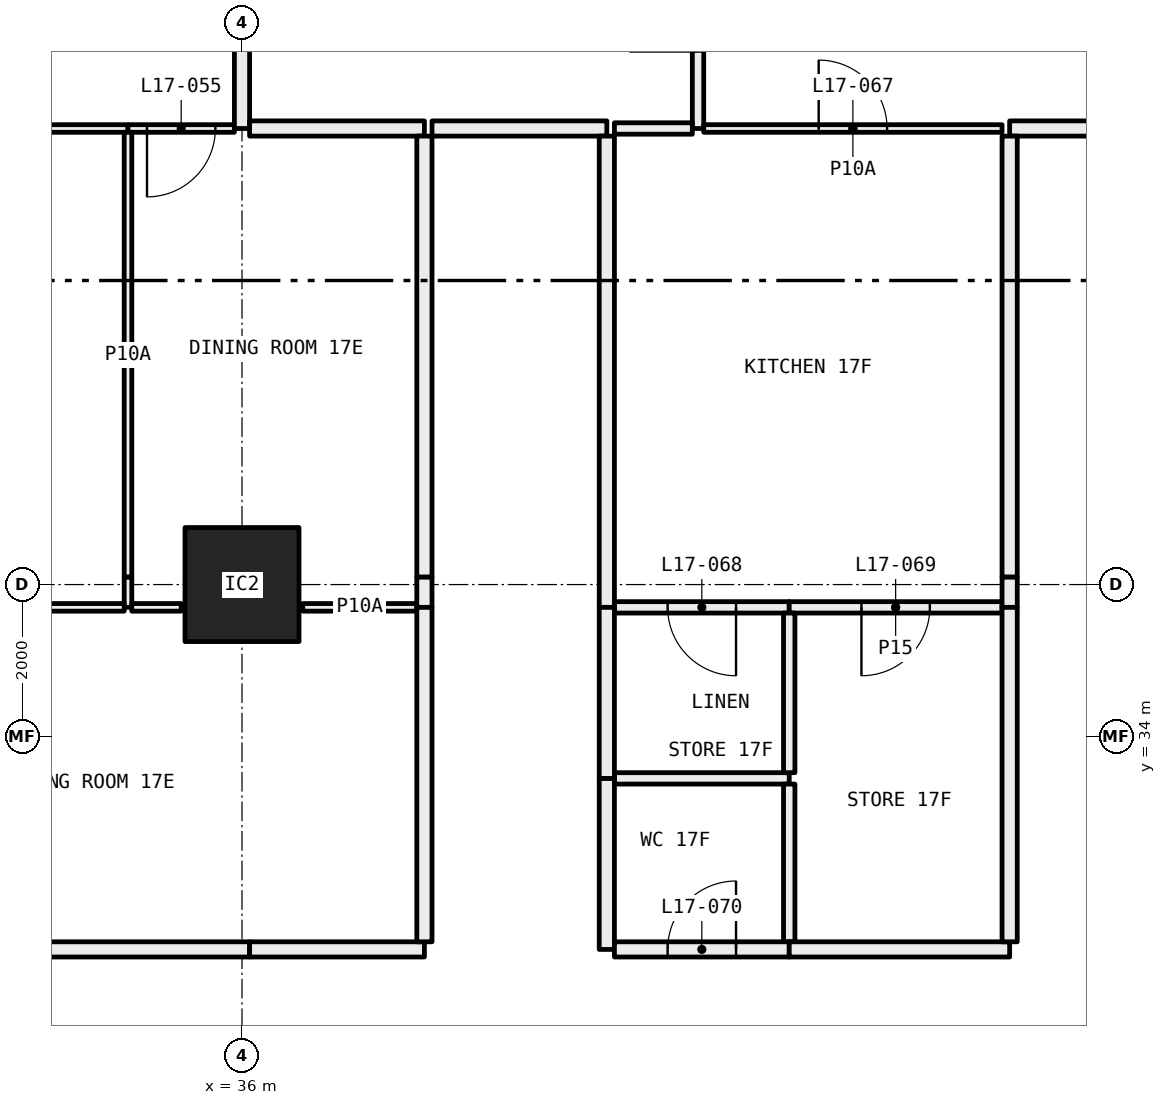
"""IFC4 building model, lengths in metres.
Left out: names, types, materials, properties, quantities, classifications, styles, units other than length and angle.
Written with IfcOpenShell. Run it as: python <this file> out.ifc"""

import sys

from ifc_helpers import new_model, si_unit, direction, frame, frame_2d, origin, origin_2d, place, context, subcontext, project, spatial, rectangle, hollow_rectangle, extrude, element, fill, save


model = new_model("IFC4")
c1 = context("Model", 3, precision=1e-05, world=origin(), true_north=direction((0.0, 1.0)))
c2 = subcontext(c1, "Body", "Model", "MODEL_VIEW")
j1 = project(units=[si_unit("LENGTHUNIT", "METRE"), si_unit("PLANEANGLEUNIT", "RADIAN")], contexts=[c1])
p1 = place(None, origin())
s1 = spatial("IfcSite", under=j1, at=p1, CompositionType="ELEMENT")
p2 = place(p1, origin())
s2 = spatial("IfcBuilding", under=s1, at=p2, CompositionType="ELEMENT")
p3 = place(p2, frame((0.0, 0.0, 71.4)))
s3 = spatial("IfcBuildingStorey", under=s2, at=p3, CompositionType="ELEMENT", Elevation=71.4)
p4 = place(p3, frame((36.0, 36.0, 0.0), z_axis=(0.0, 0.0, 1.0), x_axis=(1.0, 0.0, 0.0)))
e1 = element("IfcColumn", 1, at=p4, inside=s3, PredefinedType="COLUMN", context=c2, shape_type="SweptSolid", body=[
    extrude(hollow_rectangle(XDim=1.5, YDim=1.5, WallThickness=0.065, at=origin_2d()), origin(), (0.0, 0.0, 1.0), 3.05),
])
p5 = place(p3, frame((30.05, 42.0, 0.0), z_axis=(0.0, 0.0, 1.0), x_axis=(1.0, 0.0, 0.0)))
e2 = element("IfcWall", 2, at=p5, inside=s3, PredefinedType="PARTITIONING", context=c2, shape_type="SweptSolid", body=[
    extrude(rectangle(XDim=4.45, YDim=0.1, at=frame_2d((2.225, 0.0))), origin(), (0.0, 0.0, 1.0), 3.05),
])
p6 = place(p5, frame((1.775, 0.0, 0.0)))
e3 = element("IfcOpeningElement", 3, at=p6, cuts=e2, PredefinedType="OPENING", context=c2, shape_type="SweptSolid", body=[
    extrude(rectangle(XDim=0.9, YDim=2.1, at=frame_2d((0.45, 1.05))), frame((0.0, 0.06, 0.0), z_axis=(0.0, -1.0, 0.0), x_axis=(1.0, 0.0, 0.0)), (0.0, 0.0, 1.0), 0.12),
])
p7 = place(p3, frame((34.5, 42.0, 0.0), z_axis=(0.0, 0.0, 1.0), x_axis=(1.0, 0.0, 0.0)))
e4 = element("IfcWall", 4, at=p7, inside=s3, PredefinedType="PARTITIONING", context=c2, shape_type="SweptSolid", body=[
    extrude(rectangle(XDim=1.4, YDim=0.1, at=frame_2d((0.7, 0.0))), origin(), (0.0, 0.0, 1.0), 3.05),
])
p8 = place(p7, frame((0.25, 0.0, 0.0)))
e5 = element("IfcOpeningElement", 5, at=p8, cuts=e4, PredefinedType="OPENING", context=c2, shape_type="SweptSolid", body=[
    extrude(rectangle(XDim=0.9, YDim=2.1, at=frame_2d((0.45, 1.05))), frame((0.0, 0.06, 0.0), z_axis=(0.0, -1.0, 0.0), x_axis=(1.0, 0.0, 0.0)), (0.0, 0.0, 1.0), 0.12),
])
p9 = place(p3, frame((36.0, 42.0, 0.0), z_axis=(0.0, 0.0, 1.0), x_axis=(0.0, 1.0, 0.0)))
e6 = element("IfcWall", 6, at=p9, inside=s3, PredefinedType="PARTITIONING", context=c2, shape_type="SweptSolid", body=[
    extrude(rectangle(XDim=3.0, YDim=0.2, at=frame_2d((1.5, 0.0))), origin(), (0.0, 0.0, 1.0), 2.45),
])
p10 = place(p3, frame((34.5, 35.7, 0.0), z_axis=(0.0, 0.0, 1.0), x_axis=(0.0, 1.0, 0.0)))
e7 = element("IfcWall", 7, at=p10, inside=s3, PredefinedType="PARTITIONING", context=c2, shape_type="SweptSolid", body=[
    extrude(rectangle(XDim=0.4, YDim=0.1, at=frame_2d((0.2, 0.0))), origin(), (0.0, 0.0, 1.0), 2.45),
])
p11 = place(p3, frame((34.5, 36.1, 0.0), z_axis=(0.0, 0.0, 1.0), x_axis=(0.0, 1.0, 0.0)))
e8 = element("IfcWall", 8, at=p11, inside=s3, PredefinedType="PARTITIONING", context=c2, shape_type="SweptSolid", body=[
    extrude(rectangle(XDim=5.85, YDim=0.1, at=frame_2d((2.925, 0.0))), origin(), (0.0, 0.0, 1.0), 3.05),
])
p12 = place(p3, frame((30.075, 35.7, 0.0), z_axis=(0.0, 0.0, 1.0), x_axis=(1.0, 0.0, 0.0)))
e9 = element("IfcWall", 9, at=p12, inside=s3, PredefinedType="PARTITIONING", context=c2, shape_type="SweptSolid", body=[
    extrude(rectangle(XDim=4.375, YDim=0.1, at=frame_2d((2.188, 0.0))), origin(), (0.0, 0.0, 1.0), 3.05),
])
p13 = place(p12, frame((1.738, 0.0, 0.0)))
e10 = element("IfcOpeningElement", 10, at=p13, cuts=e9, PredefinedType="OPENING", context=c2, shape_type="SweptSolid", body=[
    extrude(rectangle(XDim=0.9, YDim=2.1, at=frame_2d((0.45, 1.05))), frame((0.0, 0.06, 0.0), z_axis=(0.0, -1.0, 0.0), x_axis=(1.0, 0.0, 0.0)), (0.0, 0.0, 1.0), 0.12),
])
p14 = place(p3, frame((34.55, 35.7, 0.0), z_axis=(0.0, 0.0, 1.0), x_axis=(1.0, 0.0, 0.0)))
e11 = element("IfcWall", 11, at=p14, inside=s3, PredefinedType="PARTITIONING", context=c2, shape_type="SweptSolid", body=[
    extrude(rectangle(XDim=0.65, YDim=0.1, at=frame_2d((0.325, 0.0))), origin(), (0.0, 0.0, 1.0), 3.05),
])
p15 = place(p3, frame((36.8, 35.7, 0.0), z_axis=(0.0, 0.0, 1.0), x_axis=(1.0, 0.0, 0.0)))
e12 = element("IfcWall", 12, at=p15, inside=s3, PredefinedType="PARTITIONING", context=c2, shape_type="SweptSolid", body=[
    extrude(rectangle(XDim=1.5, YDim=0.1, at=frame_2d((0.75, 0.0))), origin(), (0.0, 0.0, 1.0), 3.05),
])
p16 = place(p3, frame((38.4, 42.0, 0.0), z_axis=(0.0, 0.0, 1.0), x_axis=(-1.0, 0.0, 0.0)))
e13 = element("IfcWall", 13, at=p16, inside=s3, PredefinedType="PARTITIONING", context=c2, shape_type="SweptSolid", body=[
    extrude(rectangle(XDim=2.3, YDim=0.2, at=frame_2d((1.15, 0.0))), origin(), (0.0, 0.0, 1.0), 3.05),
])
p17 = place(p3, frame((38.4, 35.7, 0.0), z_axis=(0.0, 0.0, 1.0), x_axis=(0.0, 1.0, 0.0)))
e14 = element("IfcWall", 14, at=p17, inside=s3, PredefinedType="PARTITIONING", context=c2, shape_type="SweptSolid", body=[
    extrude(rectangle(XDim=0.4, YDim=0.2, at=frame_2d((0.2, 0.0))), origin(), (0.0, 0.0, 1.0), 2.45),
])
p18 = place(p3, frame((38.4, 36.1, 0.0), z_axis=(0.0, 0.0, 1.0), x_axis=(0.0, 1.0, 0.0)))
e15 = element("IfcWall", 15, at=p18, inside=s3, PredefinedType="PARTITIONING", context=c2, shape_type="SweptSolid", body=[
    extrude(rectangle(XDim=5.8, YDim=0.2, at=frame_2d((2.9, 0.0))), origin(), (0.0, 0.0, 1.0), 3.05),
])
p19 = place(p3, frame((30.0, 31.2, 0.0), z_axis=(0.0, 0.0, 1.0), x_axis=(1.0, 0.0, 0.0)))
e16 = element("IfcWall", 16, at=p19, inside=s3, PredefinedType="PARTITIONING", context=c2, shape_type="SweptSolid", body=[
    extrude(rectangle(XDim=6.1, YDim=0.2, at=frame_2d((3.05, 0.0))), origin(), (0.0, 0.0, 1.0), 2.45),
])
p20 = place(p3, frame((36.1, 31.2, 0.0), z_axis=(0.0, 0.0, 1.0), x_axis=(1.0, 0.0, 0.0)))
e17 = element("IfcWall", 17, at=p20, inside=s3, PredefinedType="PARTITIONING", context=c2, shape_type="SweptSolid", body=[
    extrude(rectangle(XDim=2.3, YDim=0.2, at=frame_2d((1.15, 0.0))), origin(), (0.0, 0.0, 1.0), 3.05),
])
p21 = place(p3, frame((38.4, 31.3, 0.0), z_axis=(0.0, 0.0, 1.0), x_axis=(0.0, 1.0, 0.0)))
e18 = element("IfcWall", 18, at=p21, inside=s3, PredefinedType="PARTITIONING", context=c2, shape_type="SweptSolid", body=[
    extrude(rectangle(XDim=4.4, YDim=0.2, at=frame_2d((2.2, 0.0))), origin(), (0.0, 0.0, 1.0), 3.05),
])
p22 = place(p3, frame((42.0, 42.0, 0.0), z_axis=(0.0, 0.0, 1.0), x_axis=(0.0, 1.0, 0.0)))
e19 = element("IfcWall", 19, at=p22, inside=s3, PredefinedType="PARTITIONING", context=c2, shape_type="SweptSolid", body=[
    extrude(rectangle(XDim=2.925, YDim=0.15, at=frame_2d((1.462, 0.0))), origin(), (0.0, 0.0, 1.0), 3.05),
])
p23 = place(p22, frame((1.012, 0.0, 0.0)))
e20 = element("IfcOpeningElement", 20, at=p23, cuts=e19, PredefinedType="OPENING", context=c2, shape_type="SweptSolid", body=[
    extrude(rectangle(XDim=0.9, YDim=2.1, at=frame_2d((0.45, 1.05))), frame((0.0, 0.085, 0.0), z_axis=(0.0, -1.0, 0.0), x_axis=(1.0, 0.0, 0.0)), (0.0, 0.0, 1.0), 0.17),
])
p24 = place(p3, frame((40.9, 42.0, 0.0), z_axis=(0.0, 0.0, 1.0), x_axis=(1.0, 0.0, 0.0)))
e21 = element("IfcWall", 21, at=p24, inside=s3, PredefinedType="PARTITIONING", context=c2, shape_type="SweptSolid", body=[
    extrude(rectangle(XDim=1.025, YDim=0.15, at=frame_2d((0.513, 0.0))), origin(), (0.0, 0.0, 1.0), 3.05),
])
p25 = place(p3, frame((38.5, 42.0, 0.0), z_axis=(0.0, 0.0, 1.0), x_axis=(1.0, 0.0, 0.0)))
e22 = element("IfcWall", 22, at=p25, inside=s3, PredefinedType="PARTITIONING", context=c2, shape_type="SweptSolid", body=[
    extrude(rectangle(XDim=2.3, YDim=0.2, at=frame_2d((1.15, 0.0))), origin(), (0.0, 0.0, 1.0), 3.05),
])
p26 = place(p3, frame((42.075, 42.0, 0.0), z_axis=(0.0, 0.0, 1.0), x_axis=(1.0, 0.0, 0.0)))
e23 = element("IfcWall", 23, at=p26, inside=s3, PredefinedType="PARTITIONING", context=c2, shape_type="SweptSolid", body=[
    extrude(rectangle(XDim=3.925, YDim=0.1, at=frame_2d((1.962, 0.0))), origin(), (0.0, 0.0, 1.0), 3.05),
])
p27 = place(p26, frame((1.512, 0.0, 0.0)))
e24 = element("IfcOpeningElement", 24, at=p27, cuts=e23, PredefinedType="OPENING", context=c2, shape_type="SweptSolid", body=[
    extrude(rectangle(XDim=0.9, YDim=2.1, at=frame_2d((0.45, 1.05))), frame((0.0, 0.06, 0.0), z_axis=(0.0, -1.0, 0.0), x_axis=(1.0, 0.0, 0.0)), (0.0, 0.0, 1.0), 0.12),
])
p28 = place(p3, frame((46.1, 42.0, 0.0), z_axis=(0.0, 0.0, 1.0), x_axis=(1.0, 0.0, 0.0)))
e25 = element("IfcWall", 25, at=p28, inside=s3, PredefinedType="PARTITIONING", context=c2, shape_type="SweptSolid", body=[
    extrude(rectangle(XDim=1.9, YDim=0.2, at=frame_2d((0.95, 0.0))), origin(), (0.0, 0.0, 1.0), 3.05),
])
p29 = place(p3, frame((40.9, 35.7, 0.0), z_axis=(0.0, 0.0, 1.0), x_axis=(1.0, 0.0, 0.0)))
e26 = element("IfcWall", 26, at=p29, inside=s3, PredefinedType="PARTITIONING", context=c2, shape_type="SweptSolid", body=[
    extrude(rectangle(XDim=2.3, YDim=0.15, at=frame_2d((1.15, 0.0))), origin(), (0.0, 0.0, 1.0), 3.05),
])
p30 = place(p29, frame((0.7, 0.0, 0.0)))
e27 = element("IfcOpeningElement", 27, at=p30, cuts=e26, PredefinedType="OPENING", context=c2, shape_type="SweptSolid", body=[
    extrude(rectangle(XDim=0.9, YDim=2.1, at=frame_2d((0.45, 1.05))), frame((0.0, 0.085, 0.0), z_axis=(0.0, -1.0, 0.0), x_axis=(1.0, 0.0, 0.0)), (0.0, 0.0, 1.0), 0.17),
])
p31 = place(p3, frame((43.2, 35.7, 0.0), z_axis=(0.0, 0.0, 1.0), x_axis=(1.0, 0.0, 0.0)))
e28 = element("IfcWall", 28, at=p31, inside=s3, PredefinedType="PARTITIONING", context=c2, shape_type="SweptSolid", body=[
    extrude(rectangle(XDim=2.8, YDim=0.15, at=frame_2d((1.4, 0.0))), origin(), (0.0, 0.0, 1.0), 3.05),
])
p32 = place(p31, frame((0.95, 0.0, 0.0)))
e29 = element("IfcOpeningElement", 29, at=p32, cuts=e28, PredefinedType="OPENING", context=c2, shape_type="SweptSolid", body=[
    extrude(rectangle(XDim=0.9, YDim=2.1, at=frame_2d((0.45, 1.05))), frame((0.0, 0.085, 0.0), z_axis=(0.0, -1.0, 0.0), x_axis=(1.0, 0.0, 0.0)), (0.0, 0.0, 1.0), 0.17),
])
p33 = place(p3, frame((40.8, 41.9, 0.0), z_axis=(0.0, 0.0, 1.0), x_axis=(0.0, -1.0, 0.0)))
e30 = element("IfcWall", 30, at=p33, inside=s3, PredefinedType="PARTITIONING", context=c2, shape_type="SweptSolid", body=[
    extrude(rectangle(XDim=6.2, YDim=0.2, at=frame_2d((3.1, 0.0))), origin(), (0.0, 0.0, 1.0), 2.45),
])
p34 = place(p3, frame((46.1, 35.7, 0.0), z_axis=(0.0, 0.0, 1.0), x_axis=(0.0, 1.0, 0.0)))
e31 = element("IfcWall", 31, at=p34, inside=s3, PredefinedType="PARTITIONING", context=c2, shape_type="SweptSolid", body=[
    extrude(rectangle(XDim=0.4, YDim=0.2, at=frame_2d((0.2, 0.0))), origin(), (0.0, 0.0, 1.0), 2.45),
])
p35 = place(p3, frame((46.1, 36.1, 0.0), z_axis=(0.0, 0.0, 1.0), x_axis=(0.0, 1.0, 0.0)))
e32 = element("IfcWall", 32, at=p35, inside=s3, PredefinedType="PARTITIONING", context=c2, shape_type="SweptSolid", body=[
    extrude(rectangle(XDim=5.8, YDim=0.2, at=frame_2d((2.9, 0.0))), origin(), (0.0, 0.0, 1.0), 3.05),
])
p36 = place(p3, frame((43.2, 33.45, 0.0), z_axis=(0.0, 0.0, 1.0), x_axis=(-1.0, 0.0, 0.0)))
e33 = element("IfcWall", 33, at=p36, inside=s3, PredefinedType="PARTITIONING", context=c2, shape_type="SweptSolid", body=[
    extrude(rectangle(XDim=2.3, YDim=0.15, at=frame_2d((1.15, 0.0))), origin(), (0.0, 0.0, 1.0), 3.05),
])
p37 = place(p3, frame((43.2, 31.3, 0.0), z_axis=(0.0, 0.0, 1.0), x_axis=(0.0, 1.0, 0.0)))
e34 = element("IfcWall", 34, at=p37, inside=s3, PredefinedType="PARTITIONING", context=c2, shape_type="SweptSolid", body=[
    extrude(rectangle(XDim=2.075, YDim=0.15, at=frame_2d((1.038, 0.0))), origin(), (0.0, 0.0, 1.0), 3.05),
])
p38 = place(p3, frame((40.8, 33.45, 0.0), z_axis=(0.0, 0.0, 1.0), x_axis=(0.0, -1.0, 0.0)))
e35 = element("IfcWall", 35, at=p38, inside=s3, PredefinedType="PARTITIONING", context=c2, shape_type="SweptSolid", body=[
    extrude(rectangle(XDim=2.25, YDim=0.2, at=frame_2d((1.125, 0.0))), origin(), (0.0, 0.0, 1.0), 3.05),
])
p39 = place(p3, frame((40.9, 31.2, 0.0), z_axis=(0.0, 0.0, 1.0), x_axis=(1.0, 0.0, 0.0)))
e36 = element("IfcWall", 36, at=p39, inside=s3, PredefinedType="PARTITIONING", context=c2, shape_type="SweptSolid", body=[
    extrude(rectangle(XDim=2.3, YDim=0.2, at=frame_2d((1.15, 0.0))), origin(), (0.0, 0.0, 1.0), 3.05),
])
p40 = place(p39, frame((0.7, 0.0, 0.0)))
e37 = element("IfcOpeningElement", 37, at=p40, cuts=e36, PredefinedType="OPENING", context=c2, shape_type="SweptSolid", body=[
    extrude(rectangle(XDim=0.9, YDim=2.1, at=frame_2d((0.45, 1.05))), frame((0.0, 0.11, 0.0), z_axis=(0.0, -1.0, 0.0), x_axis=(1.0, 0.0, 0.0)), (0.0, 0.0, 1.0), 0.22),
])
p41 = place(p3, frame((43.2, 33.525, 0.0), z_axis=(0.0, 0.0, 1.0), x_axis=(0.0, 1.0, 0.0)))
e38 = element("IfcWall", 38, at=p41, inside=s3, PredefinedType="PARTITIONING", context=c2, shape_type="SweptSolid", body=[
    extrude(rectangle(XDim=2.1, YDim=0.15, at=frame_2d((1.05, 0.0))), origin(), (0.0, 0.0, 1.0), 3.05),
])
p42 = place(p3, frame((40.8, 35.7, 0.0), z_axis=(0.0, 0.0, 1.0), x_axis=(0.0, -1.0, 0.0)))
e39 = element("IfcWall", 39, at=p42, inside=s3, PredefinedType="PARTITIONING", context=c2, shape_type="SweptSolid", body=[
    extrude(rectangle(XDim=2.25, YDim=0.2, at=frame_2d((1.125, 0.0))), origin(), (0.0, 0.0, 1.0), 3.05),
])
p43 = place(p3, frame((43.2, 31.2, 0.0), z_axis=(0.0, 0.0, 1.0), x_axis=(1.0, 0.0, 0.0)))
e40 = element("IfcWall", 40, at=p43, inside=s3, PredefinedType="PARTITIONING", context=c2, shape_type="SweptSolid", body=[
    extrude(rectangle(XDim=2.9, YDim=0.2, at=frame_2d((1.45, 0.0))), origin(), (0.0, 0.0, 1.0), 3.05),
])
p44 = place(p3, frame((46.1, 31.3, 0.0), z_axis=(0.0, 0.0, 1.0), x_axis=(0.0, 1.0, 0.0)))
e41 = element("IfcWall", 41, at=p44, inside=s3, PredefinedType="PARTITIONING", context=c2, shape_type="SweptSolid", body=[
    extrude(rectangle(XDim=4.4, YDim=0.2, at=frame_2d((2.2, 0.0))), origin(), (0.0, 0.0, 1.0), 3.05),
])
p45 = place(p8, frame((0.9, 0.0, 0.0), x_axis=(-1.0, 0.0, 0.0)))
e42 = element("IfcDoor", 42, at=p45, inside=s3, OperationType="SINGLE_SWING_LEFT", PredefinedType="DOOR", context=c2, shape_type="SweptSolid", body=[
    extrude(rectangle(XDim=0.9, YDim=2.1, at=frame_2d((0.45, 1.05))), frame((0.0, 0.025, 0.0), z_axis=(0.0, -1.0, 0.0), x_axis=(1.0, 0.0, 0.0)), (0.0, 0.0, 1.0), 0.05),
])
fill(e5, e42)
p46 = place(p27, origin())
e43 = element("IfcDoor", 43, at=p46, inside=s3, OperationType="SINGLE_SWING_RIGHT", PredefinedType="DOOR", context=c2, shape_type="SweptSolid", body=[
    extrude(rectangle(XDim=0.9, YDim=2.1, at=frame_2d((0.45, 1.05))), frame((0.0, 0.025, 0.0), z_axis=(0.0, -1.0, 0.0), x_axis=(1.0, 0.0, 0.0)), (0.0, 0.0, 1.0), 0.05),
])
fill(e24, e43)
p47 = place(p30, frame((0.9, 0.0, 0.0), x_axis=(-1.0, 0.0, 0.0)))
e44 = element("IfcDoor", 44, at=p47, inside=s3, OperationType="SINGLE_SWING_RIGHT", PredefinedType="DOOR", context=c2, shape_type="SweptSolid", body=[
    extrude(rectangle(XDim=0.9, YDim=2.1, at=frame_2d((0.45, 1.05))), frame((0.0, 0.025, 0.0), z_axis=(0.0, -1.0, 0.0), x_axis=(1.0, 0.0, 0.0)), (0.0, 0.0, 1.0), 0.05),
])
fill(e27, e44)
p48 = place(p32, frame((0.9, 0.0, 0.0), x_axis=(-1.0, 0.0, 0.0)))
e45 = element("IfcDoor", 45, at=p48, inside=s3, OperationType="SINGLE_SWING_LEFT", PredefinedType="DOOR", context=c2, shape_type="SweptSolid", body=[
    extrude(rectangle(XDim=0.9, YDim=2.1, at=frame_2d((0.45, 1.05))), frame((0.0, 0.025, 0.0), z_axis=(0.0, -1.0, 0.0), x_axis=(1.0, 0.0, 0.0)), (0.0, 0.0, 1.0), 0.05),
])
fill(e29, e45)
p49 = place(p40, origin())
e46 = element("IfcDoor", 46, at=p49, inside=s3, OperationType="SINGLE_SWING_LEFT", PredefinedType="DOOR", context=c2, shape_type="SweptSolid", body=[
    extrude(rectangle(XDim=0.9, YDim=2.1, at=frame_2d((0.45, 1.05))), frame((0.0, 0.025, 0.0), z_axis=(0.0, -1.0, 0.0), x_axis=(1.0, 0.0, 0.0)), (0.0, 0.0, 1.0), 0.05),
])
fill(e37, e46)
save(model, sys.argv[1])
